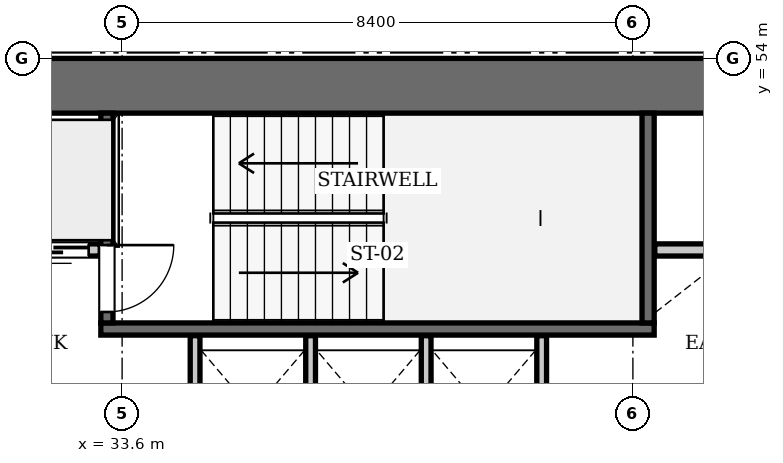
"""IFC4 building model, lengths in metres.
Left out: names, types, materials, properties, quantities, classifications, styles, units other than length and angle.
Written with IfcOpenShell. Run it as: python <this file> out.ifc"""

import sys

from ifc_helpers import new_model, si_unit, direction, frame, frame_2d, origin, place, context, subcontext, project, spatial, rectangle, extrude, element, fill, save


model = new_model("IFC4")
c1 = context("Model", 3, precision=1e-05, world=origin(), true_north=direction((0.0, 1.0)))
c2 = subcontext(c1, "Body", "Model", "MODEL_VIEW")
j1 = project(units=[si_unit("LENGTHUNIT", "METRE"), si_unit("PLANEANGLEUNIT", "RADIAN")], contexts=[c1])
p1 = place(None, origin())
s1 = spatial("IfcSite", under=j1, at=p1, CompositionType="ELEMENT")
p2 = place(p1, origin())
s2 = spatial("IfcBuilding", under=s1, at=p2, CompositionType="ELEMENT")
p3 = place(p2, frame((0.0, 0.0, 73.15)))
s3 = spatial("IfcBuildingStorey", under=s2, at=p3, CompositionType="ELEMENT", Elevation=73.15)
p4 = place(p3, frame((25.2, 53.55, 0.0), z_axis=(0.0, 0.0, 1.0), x_axis=(1.0, 0.0, 0.0)))
e1 = element("IfcWall", 1, at=p4, inside=s3, PredefinedType="SHEAR", context=c2, shape_type="SweptSolid", body=[
    extrude(rectangle(XDim=25.2, YDim=0.9, at=frame_2d((12.6, 0.0))), origin(), (0.0, 0.0, 1.0), 3.85),
])
p5 = place(p3, frame((33.25, 49.55, 0.0), z_axis=(0.0, 0.0, 1.0), x_axis=(1.0, 0.0, 0.0)))
e2 = element("IfcWall", 2, at=p5, inside=s3, PredefinedType="SOLIDWALL", context=c2, shape_type="SweptSolid", body=[
    extrude(rectangle(XDim=9.1, YDim=0.2, at=frame_2d((4.55, 0.0))), origin(), (0.0, 0.0, 1.0), 3.61),
])
p6 = place(p3, frame((42.25, 49.65, 0.0), z_axis=(0.0, 0.0, 1.0), x_axis=(0.0, 1.0, 0.0)))
e3 = element("IfcWall", 3, at=p6, inside=s3, PredefinedType="SOLIDWALL", context=c2, shape_type="SweptSolid", body=[
    extrude(rectangle(XDim=3.45, YDim=0.2, at=frame_2d((1.725, 0.0))), origin(), (0.0, 0.0, 1.0), 3.61),
])
p7 = place(p3, frame((33.35, 49.65, 0.0), z_axis=(0.0, 0.0, 1.0), x_axis=(0.0, 1.0, 0.0)))
e4 = element("IfcWall", 4, at=p7, inside=s3, PredefinedType="SOLIDWALL", context=c2, shape_type="SweptSolid", body=[
    extrude(rectangle(XDim=3.45, YDim=0.2, at=frame_2d((1.725, 0.0))), origin(), (0.0, 0.0, 1.0), 3.61),
])
p8 = place(p7, frame((0.18, 0.0, 0.0)))
e5 = element("IfcOpeningElement", 5, at=p8, cuts=e4, PredefinedType="OPENING", context=c2, shape_type="SweptSolid", body=[
    extrude(rectangle(XDim=1.1, YDim=2.15, at=frame_2d((0.55, 1.075))), frame((0.0, 0.11, 0.0), z_axis=(0.0, -1.0, 0.0), x_axis=(1.0, 0.0, 0.0)), (0.0, 0.0, 1.0), 0.22),
])
p9 = place(p3, frame((31.86, 50.85, 0.0), z_axis=(0.0, 0.0, 1.0), x_axis=(1.0, 0.0, 0.0)))
e6 = element("IfcWall", 6, at=p9, inside=s3, PredefinedType="SOLIDWALL", context=c2, shape_type="SweptSolid", body=[
    extrude(rectangle(XDim=1.38, YDim=0.2, at=frame_2d((0.69, 0.0))), origin(), (0.0, 0.0, 1.0), 3.61),
])
p10 = place(p9, frame((0.19, 0.0, 0.0)))
e7 = element("IfcOpeningElement", 7, at=p10, cuts=e6, PredefinedType="OPENING", context=c2, shape_type="SweptSolid", body=[
    extrude(rectangle(XDim=1.0, YDim=2.15, at=frame_2d((0.5, 1.075))), frame((0.0, 0.11, 0.0), z_axis=(0.0, -1.0, 0.0), x_axis=(1.0, 0.0, 0.0)), (0.0, 0.0, 1.0), 0.22),
])
p11 = place(p3, frame((42.36, 50.85, 0.0), z_axis=(0.0, 0.0, 1.0), x_axis=(1.0, 0.0, 0.0)))
e8 = element("IfcWall", 8, at=p11, inside=s3, PredefinedType="SOLIDWALL", context=c2, shape_type="SweptSolid", body=[
    extrude(rectangle(XDim=1.38, YDim=0.2, at=frame_2d((0.69, 0.0))), origin(), (0.0, 0.0, 1.0), 3.61),
])
for number, where, z_axis, x_axis in (
    (9, (34.8, 47.25, 0.0), (0.0, 0.0, 1.0), (0.0, 1.0, 0.0)),
    (10, (36.7, 47.25, 0.0), (0.0, 0.0, 1.0), (0.0, 1.0, 0.0)),
    (11, (38.6, 47.25, 0.0), (0.0, 0.0, 1.0), (0.0, 1.0, 0.0)),
    (12, (40.5, 47.25, 0.0), (0.0, 0.0, 1.0), (0.0, 1.0, 0.0)),
):
    element("IfcWall", number, at=place(p3, frame(where, z_axis=z_axis, x_axis=x_axis)), inside=s3, PredefinedType="SOLIDWALL", context=c2, shape_type="SweptSolid", body=[
        extrude(rectangle(XDim=2.19, YDim=0.16, at=frame_2d((1.095, 0.0))), origin(), (0.0, 0.0, 1.0), 3.61),
    ])
p12 = place(p8, frame((1.1, 0.0, 0.0), z_axis=(0.0, 0.0, 1.0), x_axis=(-1.0, 0.0, 0.0)))
e13 = element("IfcDoor", 13, at=p12, inside=s3, OperationType="SINGLE_SWING_LEFT", PredefinedType="DOOR", context=c2, shape_type="SweptSolid", body=[
    extrude(rectangle(XDim=1.1, YDim=2.15, at=frame_2d((0.55, 1.075))), frame((0.0, 0.025, 0.0), z_axis=(0.0, -1.0, 0.0), x_axis=(1.0, 0.0, 0.0)), (0.0, 0.0, 1.0), 0.05),
])
fill(e5, e13)
p13 = place(p10, frame((1.0, 0.0, 0.0), z_axis=(0.0, 0.0, 1.0), x_axis=(-1.0, 0.0, 0.0)))
e14 = element("IfcDoor", 14, at=p13, inside=s3, OperationType="SLIDING_TO_LEFT", PredefinedType="DOOR", context=c2, shape_type="SweptSolid", body=[
    extrude(rectangle(XDim=1.0, YDim=2.15, at=frame_2d((0.5, 1.075))), frame((0.0, 0.025, 0.0), z_axis=(0.0, -1.0, 0.0), x_axis=(1.0, 0.0, 0.0)), (0.0, 0.0, 1.0), 0.05),
])
fill(e7, e14)
save(model, sys.argv[1])
